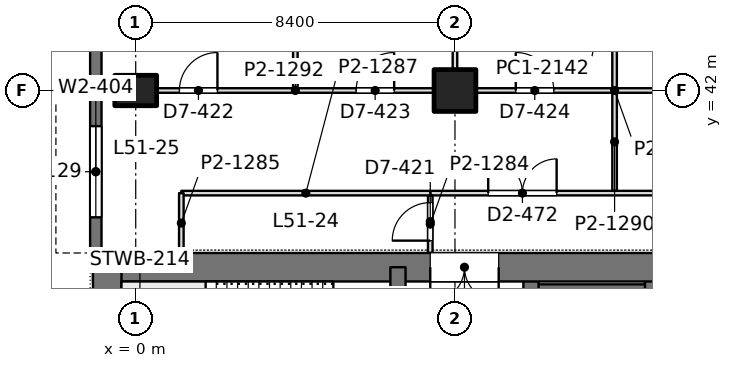
"""IFC4 building model, lengths in metres.
Left out: names, types, materials, properties, quantities, classifications, styles, units other than length and angle.
Written with IfcOpenShell. Run it as: python <this file> out.ifc"""

import sys

from ifc_helpers import new_model, si_unit, direction, frame, frame_2d, origin, origin_2d, place, context, subcontext, project, spatial, rectangle, extrude, element, fill, save


model = new_model("IFC4")
c1 = context("Model", 3, precision=1e-05, world=origin(), true_north=direction((0.0, 1.0)))
c2 = subcontext(c1, "Body", "Model", "MODEL_VIEW")
j1 = project(units=[si_unit("LENGTHUNIT", "METRE"), si_unit("PLANEANGLEUNIT", "RADIAN")], contexts=[c1])
p1 = place(None, origin())
s1 = spatial("IfcSite", under=j1, at=p1, CompositionType="ELEMENT")
p2 = place(p1, origin())
s2 = spatial("IfcBuilding", under=s1, at=p2, CompositionType="ELEMENT")
p3 = place(p2, frame((0.0, 0.0, 223.8)))
s3 = spatial("IfcBuildingStorey", under=s2, at=p3, CompositionType="ELEMENT", Elevation=223.8)
p4 = place(p3, frame((0.0, 42.0, 0.0), z_axis=(0.0, 0.0, 1.0), x_axis=(0.0, 1.0, 0.0)))
e1 = element("IfcColumn", 1, at=p4, inside=s3, PredefinedType="COLUMN", context=c2, shape_type="SweptSolid", body=[
    extrude(rectangle(XDim=0.8, YDim=1.1, at=origin_2d()), origin(), (0.0, 0.0, 1.0), 4.2),
])
p5 = place(p3, frame((8.4, 42.0, 0.0), z_axis=(0.0, 0.0, 1.0), x_axis=(1.0, 0.0, 0.0)))
e2 = element("IfcColumn", 2, at=p5, inside=s3, PredefinedType="COLUMN", context=c2, shape_type="SweptSolid", body=[
    extrude(rectangle(XDim=1.1, YDim=1.1, at=origin_2d()), origin(), (0.0, 0.0, 1.0), 4.2),
])
p6 = place(p3, frame((-1.125, 37.35, 0.0), z_axis=(0.0, 0.0, 1.0), x_axis=(1.0, 0.0, 0.0)))
e3 = element("IfcWall", 3, at=p6, inside=s3, PredefinedType="SHEAR", context=c2, shape_type="SweptSolid", body=[
    extrude(rectangle(XDim=17.85, YDim=0.75, at=frame_2d((8.925, 0.0))), origin(), (0.0, 0.0, 1.0), 4.2),
])
p7 = place(p6, frame((8.875, 0.0, 0.0)))
e4 = element("IfcOpeningElement", 4, at=p7, cuts=e3, PredefinedType="OPENING", context=c2, shape_type="SweptSolid", body=[
    extrude(rectangle(XDim=1.8, YDim=2.4, at=frame_2d((0.9, 1.2))), frame((0.0, 0.385, 0.0), z_axis=(0.0, -1.0, 0.0), x_axis=(1.0, 0.0, 0.0)), (0.0, 0.0, 1.0), 0.77),
])
p8 = place(p3, frame((-0.75, 13.05, 0.0), z_axis=(0.0, 0.0, 1.0), x_axis=(0.0, 1.0, 0.0)))
e5 = element("IfcWall", 5, at=p8, inside=s3, PredefinedType="SHEAR", context=c2, shape_type="SweptSolid", body=[
    extrude(rectangle(XDim=24.3, YDim=0.75, at=frame_2d((12.15, 0.0))), origin(), (0.0, 0.0, 1.0), 4.2),
])
p9 = place(p3, frame((6.9, 13.05, 0.0), z_axis=(0.0, 0.0, 1.0), x_axis=(0.0, 1.0, 0.0)))
e6 = element("IfcWall", 6, at=p9, inside=s3, PredefinedType="SHEAR", context=c2, shape_type="SweptSolid", body=[
    extrude(rectangle(XDim=24.3, YDim=0.4, at=frame_2d((12.15, 0.0))), origin(), (0.0, 0.0, 1.0), 4.2),
])
p10 = place(p9, frame((1.3, 0.0, 0.0)))
e7 = element("IfcOpeningElement", 7, at=p10, cuts=e6, PredefinedType="OPENING", context=c2, shape_type="SweptSolid", body=[
    extrude(rectangle(XDim=1.0, YDim=2.2, at=frame_2d((0.5, 1.1))), frame((0.0, 0.21, 0.0), z_axis=(0.0, -1.0, 0.0), x_axis=(1.0, 0.0, 0.0)), (0.0, 0.0, 1.0), 0.42),
])
p11 = place(p9, frame((22.0, 0.0, 0.0)))
e8 = element("IfcOpeningElement", 8, at=p11, cuts=e6, PredefinedType="OPENING", context=c2, shape_type="SweptSolid", body=[
    extrude(rectangle(XDim=1.0, YDim=2.2, at=frame_2d((0.5, 1.1))), frame((0.0, 0.21, 0.0), z_axis=(0.0, -1.0, 0.0), x_axis=(1.0, 0.0, 0.0)), (0.0, 0.0, 1.0), 0.42),
])
p12 = place(p9, frame((5.55, 0.0, 0.0)))
e9 = element("IfcOpeningElement", 9, at=p12, cuts=e6, PredefinedType="OPENING", context=c2, shape_type="SweptSolid", body=[
    extrude(rectangle(XDim=1.0, YDim=2.2, at=frame_2d((0.5, 1.1))), frame((0.0, 0.21, 0.0), z_axis=(0.0, -1.0, 0.0), x_axis=(1.0, 0.0, 0.0)), (0.0, 0.0, 1.0), 0.42),
])
p13 = place(p9, frame((9.55, 0.0, 0.0)))
e10 = element("IfcOpeningElement", 10, at=p13, cuts=e6, PredefinedType="OPENING", context=c2, shape_type="SweptSolid", body=[
    extrude(rectangle(XDim=1.0, YDim=2.2, at=frame_2d((0.5, 1.1))), frame((0.0, 0.21, 0.0), z_axis=(0.0, -1.0, 0.0), x_axis=(1.0, 0.0, 0.0)), (0.0, 0.0, 1.0), 0.42),
])
p14 = place(p9, frame((12.8, 0.0, 0.0)))
e11 = element("IfcOpeningElement", 11, at=p14, cuts=e6, PredefinedType="OPENING", context=c2, shape_type="SweptSolid", body=[
    extrude(rectangle(XDim=1.1, YDim=2.2, at=frame_2d((0.55, 1.1))), frame((0.0, 0.21, 0.0), z_axis=(0.0, -1.0, 0.0), x_axis=(1.0, 0.0, 0.0)), (0.0, 0.0, 1.0), 0.42),
])
p15 = place(p9, frame((15.538, 0.0, 0.0)))
e12 = element("IfcOpeningElement", 12, at=p15, cuts=e6, PredefinedType="OPENING", context=c2, shape_type="SweptSolid", body=[
    extrude(rectangle(XDim=1.1, YDim=2.2, at=frame_2d((0.55, 1.1))), frame((0.0, 0.21, 0.0), z_axis=(0.0, -1.0, 0.0), x_axis=(1.0, 0.0, 0.0)), (0.0, 0.0, 1.0), 0.42),
])
p16 = place(p9, frame((18.262, 0.0, 0.0)))
e13 = element("IfcOpeningElement", 13, at=p16, cuts=e6, PredefinedType="OPENING", context=c2, shape_type="SweptSolid", body=[
    extrude(rectangle(XDim=1.1, YDim=2.2, at=frame_2d((0.55, 1.1))), frame((0.0, 0.21, 0.0), z_axis=(0.0, -1.0, 0.0), x_axis=(1.0, 0.0, 0.0)), (0.0, 0.0, 1.0), 0.42),
])
p17 = place(p3, frame((10.4, 13.05, 0.0), z_axis=(0.0, 0.0, 1.0), x_axis=(0.0, 1.0, 0.0)))
e14 = element("IfcWall", 14, at=p17, inside=s3, PredefinedType="SHEAR", context=c2, shape_type="SweptSolid", body=[
    extrude(rectangle(XDim=24.3, YDim=0.4, at=frame_2d((12.15, 0.0))), origin(), (0.0, 0.0, 1.0), 4.2),
])
p18 = place(p17, frame((15.75, 0.0, 0.0)))
e15 = element("IfcOpeningElement", 15, at=p18, cuts=e14, PredefinedType="OPENING", context=c2, shape_type="SweptSolid", body=[
    extrude(rectangle(XDim=1.1, YDim=2.2, at=frame_2d((0.55, 1.1))), frame((0.0, 0.21, 0.0), z_axis=(0.0, -1.0, 0.0), x_axis=(1.0, 0.0, 0.0)), (0.0, 0.0, 1.0), 0.42),
])
p19 = place(p17, frame((18.6, 0.0, 0.0)))
e16 = element("IfcOpeningElement", 16, at=p19, cuts=e14, PredefinedType="OPENING", context=c2, shape_type="SweptSolid", body=[
    extrude(rectangle(XDim=1.1, YDim=2.2, at=frame_2d((0.55, 1.1))), frame((0.0, 0.21, 0.0), z_axis=(0.0, -1.0, 0.0), x_axis=(1.0, 0.0, 0.0)), (0.0, 0.0, 1.0), 0.42),
])
p20 = place(p17, frame((21.45, 0.0, 0.0)))
e17 = element("IfcOpeningElement", 17, at=p20, cuts=e14, PredefinedType="OPENING", context=c2, shape_type="SweptSolid", body=[
    extrude(rectangle(XDim=1.1, YDim=2.2, at=frame_2d((0.55, 1.1))), frame((0.0, 0.21, 0.0), z_axis=(0.0, -1.0, 0.0), x_axis=(1.0, 0.0, 0.0)), (0.0, 0.0, 1.0), 0.42),
])
p21 = place(p17, frame((6.05, 0.0, 0.0)))
e18 = element("IfcOpeningElement", 18, at=p21, cuts=e14, PredefinedType="OPENING", context=c2, shape_type="SweptSolid", body=[
    extrude(rectangle(XDim=1.8, YDim=2.4, at=frame_2d((0.9, 1.2))), frame((0.0, 0.21, 0.0), z_axis=(0.0, -1.0, 0.0), x_axis=(1.0, 0.0, 0.0)), (0.0, 0.0, 1.0), 0.42),
])
p22 = place(p17, frame((11.25, 0.0, 0.0)))
e19 = element("IfcOpeningElement", 19, at=p22, cuts=e14, PredefinedType="OPENING", context=c2, shape_type="SweptSolid", body=[
    extrude(rectangle(XDim=1.8, YDim=2.4, at=frame_2d((0.9, 1.2))), frame((0.0, 0.21, 0.0), z_axis=(0.0, -1.0, 0.0), x_axis=(1.0, 0.0, 0.0)), (0.0, 0.0, 1.0), 0.42),
])
p23 = place(p3, frame((13.6, 27.925, 0.0), z_axis=(0.0, 0.0, 1.0), x_axis=(0.0, 1.0, 0.0)))
e20 = element("IfcWall", 20, at=p23, inside=s3, PredefinedType="SHEAR", context=c2, shape_type="SweptSolid", body=[
    extrude(rectangle(XDim=9.425, YDim=0.4, at=frame_2d((4.712, 0.0))), origin(), (0.0, 0.0, 1.0), 4.2),
])
p24 = place(p3, frame((10.4, 36.625, 0.0), z_axis=(0.0, 0.0, 1.0), x_axis=(1.0, 0.0, 0.0)))
e21 = element("IfcWall", 21, at=p24, inside=s3, PredefinedType="SHEAR", context=c2, shape_type="SweptSolid", body=[
    extrude(rectangle(XDim=3.2, YDim=0.55, at=frame_2d((1.6, 0.0))), origin(), (0.0, 0.0, 1.0), 4.2),
])
p25 = place(p3, frame((-1.05, 37.725, 0.0), z_axis=(0.0, 0.0, 1.0), x_axis=(0.0, 1.0, 0.0)))
e22 = element("IfcWall", 22, at=p25, inside=s3, PredefinedType="SOLIDWALL", context=c2, shape_type="SweptSolid", body=[
    extrude(rectangle(XDim=4.275, YDim=0.3, at=frame_2d((2.137, 0.0))), origin(), (0.0, 0.0, 1.0), 4.05),
])
p26 = place(p25, frame((0.938, 0.0, 0.9)))
e23 = element("IfcOpeningElement", 23, at=p26, cuts=e22, PredefinedType="OPENING", context=c2, shape_type="SweptSolid", body=[
    extrude(rectangle(XDim=2.4, YDim=1.9, at=frame_2d((1.2, 0.95))), frame((0.0, 0.16, 0.0), z_axis=(0.0, -1.0, 0.0), x_axis=(1.0, 0.0, 0.0)), (0.0, 0.0, 1.0), 0.32),
])
p27 = place(p3, frame((-1.05, 42.0, 0.0), z_axis=(0.0, 0.0, 1.0), x_axis=(0.0, 1.0, 0.0)))
e24 = element("IfcWall", 24, at=p27, inside=s3, PredefinedType="SOLIDWALL", context=c2, shape_type="SweptSolid", body=[
    extrude(rectangle(XDim=2.485, YDim=0.3, at=frame_2d((1.243, 0.0))), origin(), (0.0, 0.0, 1.0), 4.05),
])
p28 = place(p3, frame((0.549, 42.0, 0.0), z_axis=(0.0, 0.0, 1.0), x_axis=(1.0, 0.0, 0.0)))
e25 = element("IfcWall", 25, at=p28, inside=s3, PredefinedType="PARTITIONING", context=c2, shape_type="SweptSolid", body=[
    extrude(rectangle(XDim=7.302, YDim=0.12, at=frame_2d((3.651, 0.0))), origin(), (0.0, 0.0, 1.0), 3.55),
])
p29 = place(p28, frame((0.601, 0.0, 0.0)))
e26 = element("IfcOpeningElement", 26, at=p29, cuts=e25, PredefinedType="OPENING", context=c2, shape_type="SweptSolid", body=[
    extrude(rectangle(XDim=1.0, YDim=2.4, at=frame_2d((0.5, 1.2))), frame((0.0, 0.07, 0.0), z_axis=(0.0, -1.0, 0.0), x_axis=(1.0, 0.0, 0.0)), (0.0, 0.0, 1.0), 0.14),
])
p30 = place(p28, frame((5.251, 0.0, 0.0)))
e27 = element("IfcOpeningElement", 27, at=p30, cuts=e25, PredefinedType="OPENING", context=c2, shape_type="SweptSolid", body=[
    extrude(rectangle(XDim=1.0, YDim=2.4, at=frame_2d((0.5, 1.2))), frame((0.0, 0.07, 0.0), z_axis=(0.0, -1.0, 0.0), x_axis=(1.0, 0.0, 0.0)), (0.0, 0.0, 1.0), 0.14),
])
p31 = place(p3, frame((8.949, 42.0, 0.0), z_axis=(0.0, 0.0, 1.0), x_axis=(1.0, 0.0, 0.0)))
e28 = element("IfcWall", 28, at=p31, inside=s3, PredefinedType="PARTITIONING", context=c2, shape_type="SweptSolid", body=[
    extrude(rectangle(XDim=7.302, YDim=0.12, at=frame_2d((3.651, 0.0))), origin(), (0.0, 0.0, 1.0), 3.55),
])
p32 = place(p31, frame((1.051, 0.0, 0.0)))
e29 = element("IfcOpeningElement", 29, at=p32, cuts=e28, PredefinedType="OPENING", context=c2, shape_type="SweptSolid", body=[
    extrude(rectangle(XDim=1.0, YDim=2.4, at=frame_2d((0.5, 1.2))), frame((0.0, 0.07, 0.0), z_axis=(0.0, -1.0, 0.0), x_axis=(1.0, 0.0, 0.0)), (0.0, 0.0, 1.0), 0.14),
])
p33 = place(p31, frame((5.251, 0.0, 0.0)))
e30 = element("IfcOpeningElement", 30, at=p33, cuts=e28, PredefinedType="OPENING", context=c2, shape_type="SweptSolid", body=[
    extrude(rectangle(XDim=1.0, YDim=2.4, at=frame_2d((0.5, 1.2))), frame((0.0, 0.07, 0.0), z_axis=(0.0, -1.0, 0.0), x_axis=(1.0, 0.0, 0.0)), (0.0, 0.0, 1.0), 0.14),
])
p34 = place(p3, frame((4.2, 42.058, 0.0), z_axis=(0.0, 0.0, 1.0), x_axis=(0.0, 1.0, 0.0)))
e31 = element("IfcWall", 31, at=p34, inside=s3, PredefinedType="PARTITIONING", context=c2, shape_type="SweptSolid", body=[
    extrude(rectangle(XDim=3.644, YDim=0.12, at=frame_2d((1.822, 0.0))), origin(), (0.0, 0.0, 1.0), 3.55),
])
p35 = place(p3, frame((8.4, 42.549, 0.0), z_axis=(0.0, 0.0, 1.0), x_axis=(0.0, 1.0, 0.0)))
e32 = element("IfcWall", 32, at=p35, inside=s3, PredefinedType="PARTITIONING", context=c2, shape_type="SweptSolid", body=[
    extrude(rectangle(XDim=1.702, YDim=0.12, at=frame_2d((0.851, 0.0))), origin(), (0.0, 0.0, 1.0), 3.69),
])
p36 = place(p3, frame((12.6, 42.058, 0.0), z_axis=(0.0, 0.0, 1.0), x_axis=(0.0, 1.0, 0.0)))
e33 = element("IfcWall", 33, at=p36, inside=s3, PredefinedType="PARTITIONING", context=c2, shape_type="SweptSolid", body=[
    extrude(rectangle(XDim=3.644, YDim=0.12, at=frame_2d((1.822, 0.0))), origin(), (0.0, 0.0, 1.0), 3.55),
])
p37 = place(p3, frame((12.6, 39.358, 0.0), z_axis=(0.0, 0.0, 1.0), x_axis=(0.0, 1.0, 0.0)))
e34 = element("IfcWall", 34, at=p37, inside=s3, PredefinedType="PARTITIONING", context=c2, shape_type="SweptSolid", body=[
    extrude(rectangle(XDim=2.584, YDim=0.12, at=frame_2d((1.292, 0.0))), origin(), (0.0, 0.0, 1.0), 3.55),
])
p38 = place(p3, frame((7.748, 39.3, 0.0), z_axis=(0.0, 0.0, 1.0), x_axis=(1.0, 0.0, 0.0)))
e35 = element("IfcWall", 35, at=p38, inside=s3, PredefinedType="PARTITIONING", context=c2, shape_type="SweptSolid", body=[
    extrude(rectangle(XDim=41.452, YDim=0.12, at=frame_2d((20.726, 0.0))), origin(), (0.0, 0.0, 1.0), 3.55),
])
p39 = place(p38, frame((1.527, 0.0, 0.0)))
e36 = element("IfcOpeningElement", 36, at=p39, cuts=e35, PredefinedType="OPENING", context=c2, shape_type="SweptSolid", body=[
    extrude(rectangle(XDim=1.8, YDim=2.2, at=frame_2d((0.9, 1.1))), frame((0.0, 0.07, 0.0), z_axis=(0.0, -1.0, 0.0), x_axis=(1.0, 0.0, 0.0)), (0.0, 0.0, 1.0), 0.14),
])
p40 = place(p38, frame((8.152, 0.0, 0.0)))
e37 = element("IfcOpeningElement", 37, at=p40, cuts=e35, PredefinedType="OPENING", context=c2, shape_type="SweptSolid", body=[
    extrude(rectangle(XDim=1.8, YDim=2.2, at=frame_2d((0.9, 1.1))), frame((0.0, 0.07, 0.0), z_axis=(0.0, -1.0, 0.0), x_axis=(1.0, 0.0, 0.0)), (0.0, 0.0, 1.0), 0.14),
])
p41 = place(p38, frame((12.352, 0.0, 0.0)))
e38 = element("IfcOpeningElement", 38, at=p41, cuts=e35, PredefinedType="OPENING", context=c2, shape_type="SweptSolid", body=[
    extrude(rectangle(XDim=1.8, YDim=2.2, at=frame_2d((0.9, 1.1))), frame((0.0, 0.07, 0.0), z_axis=(0.0, -1.0, 0.0), x_axis=(1.0, 0.0, 0.0)), (0.0, 0.0, 1.0), 0.14),
])
p42 = place(p38, frame((20.752, 0.0, 0.0)))
e39 = element("IfcOpeningElement", 39, at=p42, cuts=e35, PredefinedType="OPENING", context=c2, shape_type="SweptSolid", body=[
    extrude(rectangle(XDim=1.8, YDim=2.2, at=frame_2d((0.9, 1.1))), frame((0.0, 0.07, 0.0), z_axis=(0.0, -1.0, 0.0), x_axis=(1.0, 0.0, 0.0)), (0.0, 0.0, 1.0), 0.14),
])
p43 = place(p38, frame((24.952, 0.0, 0.0)))
e40 = element("IfcOpeningElement", 40, at=p43, cuts=e35, PredefinedType="OPENING", context=c2, shape_type="SweptSolid", body=[
    extrude(rectangle(XDim=1.8, YDim=2.2, at=frame_2d((0.9, 1.1))), frame((0.0, 0.07, 0.0), z_axis=(0.0, -1.0, 0.0), x_axis=(1.0, 0.0, 0.0)), (0.0, 0.0, 1.0), 0.14),
])
p44 = place(p38, frame((32.952, 0.0, 0.0)))
e41 = element("IfcOpeningElement", 41, at=p44, cuts=e35, PredefinedType="OPENING", context=c2, shape_type="SweptSolid", body=[
    extrude(rectangle(XDim=1.8, YDim=2.2, at=frame_2d((0.9, 1.1))), frame((0.0, 0.07, 0.0), z_axis=(0.0, -1.0, 0.0), x_axis=(1.0, 0.0, 0.0)), (0.0, 0.0, 1.0), 0.14),
])
p45 = place(p38, frame((36.752, 0.0, 0.0)))
e42 = element("IfcOpeningElement", 42, at=p45, cuts=e35, PredefinedType="OPENING", context=c2, shape_type="SweptSolid", body=[
    extrude(rectangle(XDim=1.8, YDim=2.2, at=frame_2d((0.9, 1.1))), frame((0.0, 0.07, 0.0), z_axis=(0.0, -1.0, 0.0), x_axis=(1.0, 0.0, 0.0)), (0.0, 0.0, 1.0), 0.14),
])
p46 = place(p3, frame((7.75, 37.724, 0.0), z_axis=(0.0, 0.0, 1.0), x_axis=(0.0, 1.0, 0.0)))
e43 = element("IfcWall", 43, at=p46, inside=s3, PredefinedType="PARTITIONING", context=c2, shape_type="SweptSolid", body=[
    extrude(rectangle(XDim=1.518, YDim=0.12, at=frame_2d((0.759, 0.0))), origin(), (0.0, 0.0, 1.0), 4.05),
])
p47 = place(p46, frame((0.326, 0.0, 0.0)))
e44 = element("IfcOpeningElement", 44, at=p47, cuts=e43, PredefinedType="OPENING", context=c2, shape_type="SweptSolid", body=[
    extrude(rectangle(XDim=1.0, YDim=2.4, at=frame_2d((0.5, 1.2))), frame((0.0, 0.07, 0.0), z_axis=(0.0, -1.0, 0.0), x_axis=(1.0, 0.0, 0.0)), (0.0, 0.0, 1.0), 0.14),
])
p48 = place(p3, frame((1.2, 39.3, 0.0), z_axis=(0.0, 0.0, 1.0), x_axis=(1.0, 0.0, 0.0)))
e45 = element("IfcWall", 45, at=p48, inside=s3, PredefinedType="PARTITIONING", context=c2, shape_type="SweptSolid", body=[
    extrude(rectangle(XDim=6.552, YDim=0.12, at=frame_2d((3.276, 0.0))), origin(), (0.0, 0.0, 1.0), 3.69),
])
p49 = place(p3, frame((1.2, 37.724, 0.0), z_axis=(0.0, 0.0, 1.0), x_axis=(0.0, 1.0, 0.0)))
e46 = element("IfcWall", 46, at=p49, inside=s3, PredefinedType="PARTITIONING", context=c2, shape_type="SweptSolid", body=[
    extrude(rectangle(XDim=1.576, YDim=0.12, at=frame_2d((0.788, 0.0))), origin(), (0.0, 0.0, 1.0), 4.05),
])
p50 = place(p26, origin())
e47 = element("IfcWindow", 47, at=p50, inside=s3, PartitioningType="SINGLE_PANEL", PredefinedType="WINDOW", context=c2, shape_type="SweptSolid", body=[
    extrude(rectangle(XDim=2.4, YDim=1.9, at=frame_2d((1.2, 0.95))), frame((0.0, 0.03, 0.0), z_axis=(0.0, -1.0, 0.0), x_axis=(1.0, 0.0, 0.0)), (0.0, 0.0, 1.0), 0.06),
])
fill(e23, e47)
p51 = place(p7, frame((1.8, 0.0, 0.0), z_axis=(0.0, 0.0, 1.0), x_axis=(-1.0, 0.0, 0.0)))
e48 = element("IfcDoor", 48, at=p51, inside=s3, OperationType="DOUBLE_DOOR_SINGLE_SWING", PredefinedType="DOOR", context=c2, shape_type="SweptSolid", body=[
    extrude(rectangle(XDim=1.8, YDim=2.4, at=frame_2d((0.9, 1.2))), frame((0.0, 0.025, 0.0), z_axis=(0.0, -1.0, 0.0), x_axis=(1.0, 0.0, 0.0)), (0.0, 0.0, 1.0), 0.05),
])
fill(e4, e48)
p52 = place(p29, origin())
e49 = element("IfcDoor", 49, at=p52, inside=s3, OperationType="SINGLE_SWING_RIGHT", PredefinedType="DOOR", context=c2, shape_type="SweptSolid", body=[
    extrude(rectangle(XDim=1.0, YDim=2.4, at=frame_2d((0.5, 1.2))), frame((0.0, 0.025, 0.0), z_axis=(0.0, -1.0, 0.0), x_axis=(1.0, 0.0, 0.0)), (0.0, 0.0, 1.0), 0.05),
])
fill(e26, e49)
p53 = place(p30, origin())
e50 = element("IfcDoor", 50, at=p53, inside=s3, OperationType="SINGLE_SWING_RIGHT", PredefinedType="DOOR", context=c2, shape_type="SweptSolid", body=[
    extrude(rectangle(XDim=1.0, YDim=2.4, at=frame_2d((0.5, 1.2))), frame((0.0, 0.025, 0.0), z_axis=(0.0, -1.0, 0.0), x_axis=(1.0, 0.0, 0.0)), (0.0, 0.0, 1.0), 0.05),
])
fill(e27, e50)
p54 = place(p32, origin())
e51 = element("IfcDoor", 51, at=p54, inside=s3, OperationType="SINGLE_SWING_LEFT", PredefinedType="DOOR", context=c2, shape_type="SweptSolid", body=[
    extrude(rectangle(XDim=1.0, YDim=2.4, at=frame_2d((0.5, 1.2))), frame((0.0, 0.025, 0.0), z_axis=(0.0, -1.0, 0.0), x_axis=(1.0, 0.0, 0.0)), (0.0, 0.0, 1.0), 0.05),
])
fill(e29, e51)
p55 = place(p39, origin())
e52 = element("IfcDoor", 52, at=p55, inside=s3, OperationType="DOUBLE_DOOR_SINGLE_SWING", PredefinedType="DOOR", context=c2, shape_type="SweptSolid", body=[
    extrude(rectangle(XDim=1.8, YDim=2.2, at=frame_2d((0.9, 1.1))), frame((0.0, 0.025, 0.0), z_axis=(0.0, -1.0, 0.0), x_axis=(1.0, 0.0, 0.0)), (0.0, 0.0, 1.0), 0.05),
])
fill(e36, e52)
p56 = place(p47, origin())
e53 = element("IfcDoor", 53, at=p56, inside=s3, OperationType="SINGLE_SWING_LEFT", PredefinedType="DOOR", context=c2, shape_type="SweptSolid", body=[
    extrude(rectangle(XDim=1.0, YDim=2.4, at=frame_2d((0.5, 1.2))), frame((0.0, 0.025, 0.0), z_axis=(0.0, -1.0, 0.0), x_axis=(1.0, 0.0, 0.0)), (0.0, 0.0, 1.0), 0.05),
])
fill(e44, e53)
save(model, sys.argv[1])
